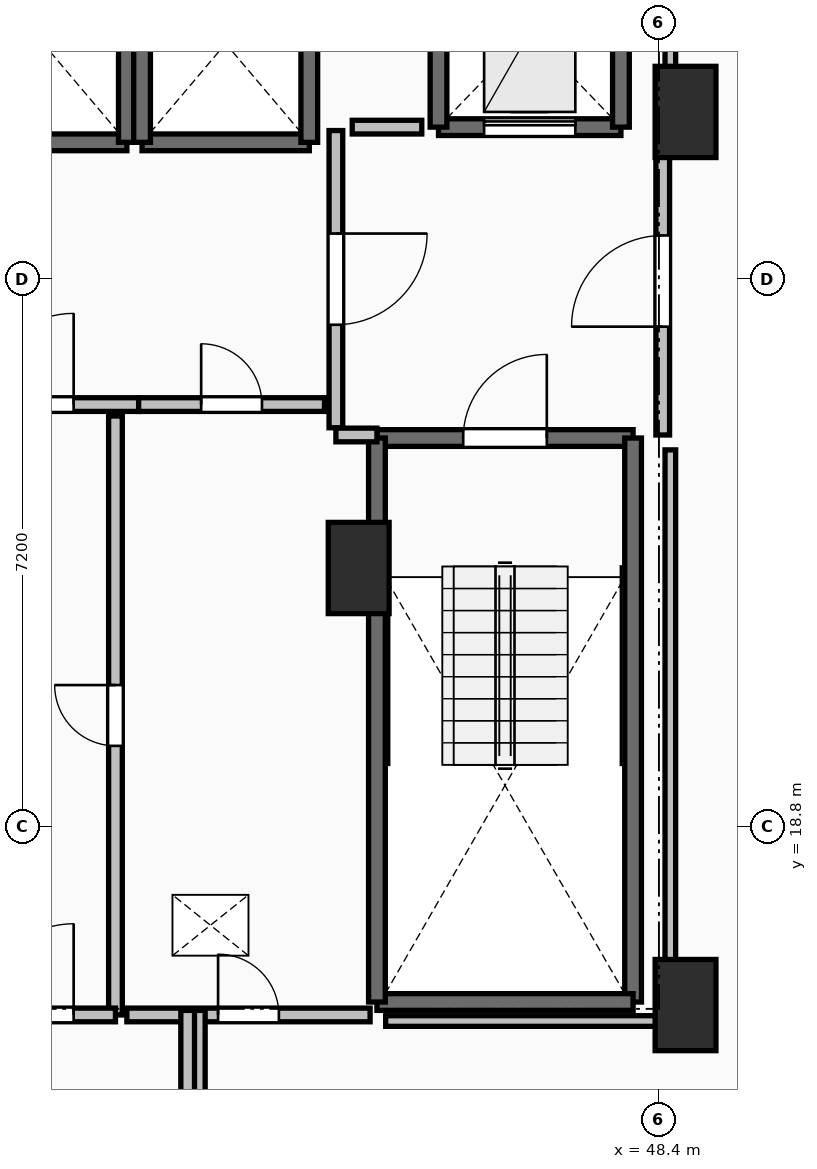
"""IFC4 building model, lengths in metres.
Left out: names, types, materials, properties, quantities, classifications, styles, units other than length and angle.
Written with IfcOpenShell. Run it as: python <this file> out.ifc"""

import sys

from ifc_helpers import new_model, si_unit, direction, frame, frame_2d, origin, origin_2d, place, context, subcontext, project, spatial, rectangle, extrude, element, fill, save


model = new_model("IFC4")
c1 = context("Model", 3, precision=1e-05, world=origin(), true_north=direction((0.0, 1.0)))
c2 = subcontext(c1, "Body", "Model", "MODEL_VIEW")
j1 = project(units=[si_unit("LENGTHUNIT", "METRE"), si_unit("PLANEANGLEUNIT", "RADIAN")], contexts=[c1])
p1 = place(None, origin())
s1 = spatial("IfcSite", under=j1, at=p1, CompositionType="ELEMENT")
p2 = place(p1, origin())
s2 = spatial("IfcBuilding", under=s1, at=p2, CompositionType="ELEMENT")
p3 = place(p2, frame((0.0, 0.0, 89.3)))
s3 = spatial("IfcBuildingStorey", under=s2, at=p3, CompositionType="ELEMENT", Elevation=89.3)
for number, where, z_axis, x_axis in (
    (1, (48.75, 28.2, 0.0), (0.0, 0.0, 1.0), (1.0, 0.0, 0.0)),
    (2, (48.75, 16.45, 0.0), (0.0, 0.0, 1.0), (1.0, 0.0, 0.0)),
    (3, (44.45, 22.2, 0.0), (0.0, 0.0, 1.0), (1.0, 0.0, 0.0)),
):
    element("IfcColumn", number, at=place(p3, frame(where, z_axis=z_axis, x_axis=x_axis)), inside=s3, PredefinedType="PILASTER", context=c2, shape_type="SweptSolid", body=[
        extrude(rectangle(XDim=0.8, YDim=1.2, at=origin_2d()), origin(), (0.0, 0.0, 1.0), 3.5),
    ])
p4 = place(p3, frame((44.69, 23.91, 0.0), z_axis=(0.0, 0.0, 1.0), x_axis=(1.0, 0.0, 0.0)))
e4 = element("IfcWall", 4, at=p4, inside=s3, PredefinedType="SOLIDWALL", context=c2, shape_type="SweptSolid", body=[
    extrude(rectangle(XDim=3.37, YDim=0.22, at=frame_2d((1.685, 0.0))), origin(), (0.0, 0.0, 1.0), 3.24),
])
p5 = place(p4, frame((1.135, 0.0, 0.0)))
e5 = element("IfcOpeningElement", 5, at=p5, cuts=e4, PredefinedType="OPENING", context=c2, shape_type="SweptSolid", body=[
    extrude(rectangle(XDim=1.1, YDim=2.15, at=frame_2d((0.55, 1.075))), frame((0.0, 0.125, 0.0), z_axis=(0.0, -1.0, 0.0), x_axis=(1.0, 0.0, 0.0)), (0.0, 0.0, 1.0), 0.25),
])
p6 = place(p3, frame((48.06, 23.91, 0.0), z_axis=(0.0, 0.0, 1.0), x_axis=(0.0, -1.0, 0.0)))
e6 = element("IfcWall", 6, at=p6, inside=s3, PredefinedType="SOLIDWALL", context=c2, shape_type="SweptSolid", body=[
    extrude(rectangle(XDim=7.42, YDim=0.22, at=frame_2d((3.71, 0.0))), origin(), (0.0, 0.0, 1.0), 3.24),
])
p7 = place(p3, frame((48.06, 16.49, 0.0), z_axis=(0.0, 0.0, 1.0), x_axis=(-1.0, 0.0, 0.0)))
e7 = element("IfcWall", 7, at=p7, inside=s3, PredefinedType="SOLIDWALL", context=c2, shape_type="SweptSolid", body=[
    extrude(rectangle(XDim=3.37, YDim=0.22, at=frame_2d((1.685, 0.0))), origin(), (0.0, 0.0, 1.0), 3.24),
])
p8 = place(p3, frame((44.69, 16.49, 0.0), z_axis=(0.0, 0.0, 1.0), x_axis=(0.0, 1.0, 0.0)))
e8 = element("IfcWall", 8, at=p8, inside=s3, PredefinedType="SOLIDWALL", context=c2, shape_type="SweptSolid", body=[
    extrude(rectangle(XDim=7.42, YDim=0.22, at=frame_2d((3.71, 0.0))), origin(), (0.0, 0.0, 1.0), 3.24),
])
p9 = place(p3, frame((39.2, 27.8, 0.0), z_axis=(0.0, 0.0, 1.0), x_axis=(1.0, 0.0, 0.0)))
e9 = element("IfcWall", 9, at=p9, inside=s3, PredefinedType="SOLIDWALL", context=c2, shape_type="SweptSolid", body=[
    extrude(rectangle(XDim=2.2, YDim=0.22, at=frame_2d((1.1, 0.0))), origin(), (0.0, 0.0, 1.0), 3.24),
])
p10 = place(p3, frame((41.4, 27.8, 0.0), z_axis=(0.0, 0.0, 1.0), x_axis=(0.0, 1.0, 0.0)))
e10 = element("IfcWall", 10, at=p10, inside=s3, PredefinedType="SOLIDWALL", context=c2, shape_type="SweptSolid", body=[
    extrude(rectangle(XDim=2.6, YDim=0.22, at=frame_2d((1.3, 0.0))), origin(), (0.0, 0.0, 1.0), 3.24),
])
p11 = place(p3, frame((41.6, 27.8, 0.0), z_axis=(0.0, 0.0, 1.0), x_axis=(1.0, 0.0, 0.0)))
e11 = element("IfcWall", 11, at=p11, inside=s3, PredefinedType="SOLIDWALL", context=c2, shape_type="SweptSolid", body=[
    extrude(rectangle(XDim=2.2, YDim=0.22, at=frame_2d((1.1, 0.0))), origin(), (0.0, 0.0, 1.0), 3.24),
])
for number, where, z_axis, x_axis in (
    (12, (43.8, 27.8, 0.0), (0.0, 0.0, 1.0), (0.0, 1.0, 0.0)),
    (13, (41.6, 30.4, 0.0), (0.0, 0.0, 1.0), (0.0, -1.0, 0.0)),
):
    element("IfcWall", number, at=place(p3, frame(where, z_axis=z_axis, x_axis=x_axis)), inside=s3, PredefinedType="SOLIDWALL", context=c2, shape_type="SweptSolid", body=[
        extrude(rectangle(XDim=2.6, YDim=0.22, at=frame_2d((1.3, 0.0))), origin(), (0.0, 0.0, 1.0), 3.24),
    ])
p12 = place(p3, frame((45.5, 28.0, 0.0), z_axis=(0.0, 0.0, 1.0), x_axis=(1.0, 0.0, 0.0)))
e14 = element("IfcWall", 14, at=p12, inside=s3, PredefinedType="SHEAR", context=c2, shape_type="SweptSolid", body=[
    extrude(rectangle(XDim=2.4, YDim=0.22, at=frame_2d((1.2, 0.0))), origin(), (0.0, 0.0, 1.0), 3.24),
])
p13 = place(p12, frame((0.6, 0.0, 0.0)))
e15 = element("IfcOpeningElement", 15, at=p13, cuts=e14, PredefinedType="OPENING", context=c2, shape_type="SweptSolid", body=[
    extrude(rectangle(XDim=1.2, YDim=2.2, at=frame_2d((0.6, 1.1))), frame((0.0, 0.125, 0.0), z_axis=(0.0, -1.0, 0.0), x_axis=(1.0, 0.0, 0.0)), (0.0, 0.0, 1.0), 0.25),
])
for number, where, z_axis, x_axis in (
    (16, (47.9, 28.0, 0.0), (0.0, 0.0, 1.0), (0.0, 1.0, 0.0)),
    (17, (45.5, 30.5, 0.0), (0.0, 0.0, 1.0), (0.0, -1.0, 0.0)),
):
    element("IfcWall", number, at=place(p3, frame(where, z_axis=z_axis, x_axis=x_axis)), inside=s3, PredefinedType="SHEAR", context=c2, shape_type="SweptSolid", body=[
        extrude(rectangle(XDim=2.5, YDim=0.22, at=frame_2d((1.25, 0.0))), origin(), (0.0, 0.0, 1.0), 3.24),
    ])
p14 = place(p3, frame((44.15, 27.955, 0.0), z_axis=(0.0, 0.0, 1.0), x_axis=(0.0, -1.0, 0.0)))
e18 = element("IfcWall", 18, at=p14, inside=s3, PredefinedType="PARTITIONING", context=c2, shape_type="SweptSolid", body=[
    extrude(rectangle(XDim=3.91, YDim=0.18, at=frame_2d((1.955, 0.0))), origin(), (0.0, 0.0, 1.0), 3.24),
])
p15 = place(p14, frame((1.355, 0.0, 0.0)))
e19 = element("IfcOpeningElement", 19, at=p15, cuts=e18, PredefinedType="OPENING", context=c2, shape_type="SweptSolid", body=[
    extrude(rectangle(XDim=1.2, YDim=2.15, at=frame_2d((0.6, 1.075))), frame((0.0, 0.105, 0.0), z_axis=(0.0, -1.0, 0.0), x_axis=(1.0, 0.0, 0.0)), (0.0, 0.0, 1.0), 0.21),
])
p16 = place(p3, frame((44.15, 23.95, 0.0), z_axis=(0.0, 0.0, 1.0), x_axis=(1.0, 0.0, 0.0)))
e20 = element("IfcWall", 20, at=p16, inside=s3, PredefinedType="PARTITIONING", context=c2, shape_type="SweptSolid", body=[
    extrude(rectangle(XDim=0.54, YDim=0.18, at=frame_2d((0.27, 0.0))), origin(), (0.0, 0.0, 1.0), 3.24),
])
p17 = place(p3, frame((48.45, 23.95, 0.0), z_axis=(0.0, 0.0, 1.0), x_axis=(0.0, 1.0, 0.0)))
e21 = element("IfcWall", 21, at=p17, inside=s3, PredefinedType="PARTITIONING", context=c2, shape_type="SweptSolid", body=[
    extrude(rectangle(XDim=4.05, YDim=0.18, at=frame_2d((2.025, 0.0))), origin(), (0.0, 0.0, 1.0), 3.24),
])
p18 = place(p17, frame((1.425, 0.0, 0.0)))
e22 = element("IfcOpeningElement", 22, at=p18, cuts=e21, PredefinedType="OPENING", context=c2, shape_type="SweptSolid", body=[
    extrude(rectangle(XDim=1.2, YDim=2.15, at=frame_2d((0.6, 1.075))), frame((0.0, 0.105, 0.0), z_axis=(0.0, -1.0, 0.0), x_axis=(1.0, 0.0, 0.0)), (0.0, 0.0, 1.0), 0.21),
])
p19 = place(p3, frame((38.645, 24.35, 0.0), z_axis=(0.0, 0.0, 1.0), x_axis=(1.0, 0.0, 0.0)))
e23 = element("IfcWall", 23, at=p19, inside=s3, PredefinedType="PARTITIONING", context=c2, shape_type="SweptSolid", body=[
    extrude(rectangle(XDim=2.91, YDim=0.18, at=frame_2d((1.455, 0.0))), origin(), (0.0, 0.0, 1.0), 3.24),
])
p20 = place(p19, frame((0.855, 0.0, 0.0)))
e24 = element("IfcOpeningElement", 24, at=p20, cuts=e23, PredefinedType="OPENING", context=c2, shape_type="SweptSolid", body=[
    extrude(rectangle(XDim=1.2, YDim=2.15, at=frame_2d((0.6, 1.075))), frame((0.0, 0.105, 0.0), z_axis=(0.0, -1.0, 0.0), x_axis=(1.0, 0.0, 0.0)), (0.0, 0.0, 1.0), 0.21),
])
p21 = place(p3, frame((41.555, 24.35, 0.0), z_axis=(0.0, 0.0, 1.0), x_axis=(1.0, 0.0, 0.0)))
e25 = element("IfcWall", 25, at=p21, inside=s3, PredefinedType="PARTITIONING", context=c2, shape_type="SweptSolid", body=[
    extrude(rectangle(XDim=2.445, YDim=0.18, at=frame_2d((1.223, 0.0))), origin(), (0.0, 0.0, 1.0), 3.24),
])
p22 = place(p21, frame((0.823, 0.0, 0.0)))
e26 = element("IfcOpeningElement", 26, at=p22, cuts=e25, PredefinedType="OPENING", context=c2, shape_type="SweptSolid", body=[
    extrude(rectangle(XDim=0.8, YDim=2.05, at=frame_2d((0.4, 1.025))), frame((0.0, 0.105, 0.0), z_axis=(0.0, -1.0, 0.0), x_axis=(1.0, 0.0, 0.0)), (0.0, 0.0, 1.0), 0.21),
])
p23 = place(p3, frame((41.25, 16.32, 0.0), z_axis=(0.0, 0.0, 1.0), x_axis=(0.0, 1.0, 0.0)))
e27 = element("IfcWall", 27, at=p23, inside=s3, PredefinedType="PARTITIONING", context=c2, shape_type="SweptSolid", body=[
    extrude(rectangle(XDim=7.88, YDim=0.18, at=frame_2d((3.94, 0.0))), origin(), (0.0, 0.0, 1.0), 3.24),
])
p24 = place(p23, frame((3.54, 0.0, 0.0)))
e28 = element("IfcOpeningElement", 28, at=p24, cuts=e27, PredefinedType="OPENING", context=c2, shape_type="SweptSolid", body=[
    extrude(rectangle(XDim=0.8, YDim=2.05, at=frame_2d((0.4, 1.025))), frame((0.0, 0.105, 0.0), z_axis=(0.0, -1.0, 0.0), x_axis=(1.0, 0.0, 0.0)), (0.0, 0.0, 1.0), 0.21),
])
p25 = place(p3, frame((38.95, 16.32, 0.0), z_axis=(0.0, 0.0, 1.0), x_axis=(1.0, 0.0, 0.0)))
e29 = element("IfcWall", 29, at=p25, inside=s3, PredefinedType="PARTITIONING", context=c2, shape_type="SweptSolid", body=[
    extrude(rectangle(XDim=2.3, YDim=0.18, at=frame_2d((1.15, 0.0))), origin(), (0.0, 0.0, 1.0), 3.24),
])
p26 = place(p25, frame((0.55, 0.0, 0.0)))
e30 = element("IfcOpeningElement", 30, at=p26, cuts=e29, PredefinedType="OPENING", context=c2, shape_type="SweptSolid", body=[
    extrude(rectangle(XDim=1.2, YDim=2.15, at=frame_2d((0.6, 1.075))), frame((0.0, 0.105, 0.0), z_axis=(0.0, -1.0, 0.0), x_axis=(1.0, 0.0, 0.0)), (0.0, 0.0, 1.0), 0.21),
])
p27 = place(p3, frame((41.4, 16.32, 0.0), z_axis=(0.0, 0.0, 1.0), x_axis=(1.0, 0.0, 0.0)))
e31 = element("IfcWall", 31, at=p27, inside=s3, PredefinedType="PARTITIONING", context=c2, shape_type="SweptSolid", body=[
    extrude(rectangle(XDim=3.2, YDim=0.18, at=frame_2d((1.6, 0.0))), origin(), (0.0, 0.0, 1.0), 3.24),
])
p28 = place(p27, frame((1.2, 0.0, 0.0)))
e32 = element("IfcOpeningElement", 32, at=p28, cuts=e31, PredefinedType="OPENING", context=c2, shape_type="SweptSolid", body=[
    extrude(rectangle(XDim=0.8, YDim=2.05, at=frame_2d((0.4, 1.025))), frame((0.0, 0.105, 0.0), z_axis=(0.0, -1.0, 0.0), x_axis=(1.0, 0.0, 0.0)), (0.0, 0.0, 1.0), 0.21),
])
for number, where, z_axis, x_axis in (
    (33, (42.34, 16.38, 0.0), (0.0, 0.0, 1.0), (0.0, -1.0, 0.0)),
    (34, (42.2, 13.96, 0.0), (0.0, 0.0, 1.0), (0.0, 1.0, 0.0)),
):
    element("IfcWall", number, at=place(p3, frame(where, z_axis=z_axis, x_axis=x_axis)), inside=s3, PredefinedType="PARTITIONING", context=c2, shape_type="SweptSolid", body=[
        extrude(rectangle(XDim=2.42, YDim=0.18, at=frame_2d((1.21, 0.0))), origin(), (0.0, 0.0, 1.0), 2.972),
    ])
p29 = place(p3, frame((45.28, 28.0, 0.0), z_axis=(0.0, 0.0, 1.0), x_axis=(-1.0, 0.0, 0.0)))
e35 = element("IfcWall", 35, at=p29, inside=s3, PredefinedType="PARTITIONING", context=c2, shape_type="SweptSolid", body=[
    extrude(rectangle(XDim=0.915, YDim=0.18, at=frame_2d((0.458, 0.0))), origin(), (0.0, 0.0, 1.0), 3.24),
])
p30 = place(p3, frame((48.55, 33.45, 0.0), z_axis=(0.0, 0.0, 1.0), x_axis=(0.0, -1.0, 0.0)))
e36 = element("IfcWall", 36, at=p30, inside=s3, PredefinedType="PARTITIONING", context=c2, shape_type="SweptSolid", body=[
    extrude(rectangle(XDim=5.254, YDim=0.14, at=frame_2d((2.627, 0.0))), origin(), (0.0, 0.0, 1.0), 2.432),
])
p31 = place(p3, frame((48.55, 23.754, 0.0), z_axis=(0.0, 0.0, 1.0), x_axis=(0.0, -1.0, 0.0)))
e37 = element("IfcWall", 37, at=p31, inside=s3, PredefinedType="PARTITIONING", context=c2, shape_type="SweptSolid", body=[
    extrude(rectangle(XDim=7.514, YDim=0.14, at=frame_2d((3.757, 0.0))), origin(), (0.0, 0.0, 1.0), 2.432),
])
p32 = place(p3, frame((48.55, 16.24, 0.0), z_axis=(0.0, 0.0, 1.0), x_axis=(-1.0, 0.0, 0.0)))
e38 = element("IfcWall", 38, at=p32, inside=s3, PredefinedType="PARTITIONING", context=c2, shape_type="SweptSolid", body=[
    extrude(rectangle(XDim=3.745, YDim=0.14, at=frame_2d((1.873, 0.0))), origin(), (0.0, 0.0, 1.0), 2.432),
])
p33 = place(p5, origin())
e39 = element("IfcDoor", 39, at=p33, inside=s3, OperationType="SINGLE_SWING_RIGHT", PredefinedType="DOOR", context=c2, shape_type="SweptSolid", body=[
    extrude(rectangle(XDim=1.1, YDim=2.15, at=frame_2d((0.55, 1.075))), frame((0.0, 0.025, 0.0), z_axis=(0.0, -1.0, 0.0), x_axis=(1.0, 0.0, 0.0)), (0.0, 0.0, 1.0), 0.05),
])
fill(e5, e39)
p34 = place(p13, origin())
e40 = element("IfcDoor", 40, at=p34, inside=s3, OperationType="SLIDING_TO_LEFT", PredefinedType="DOOR", context=c2, shape_type="SweptSolid", body=[
    extrude(rectangle(XDim=1.2, YDim=2.2, at=frame_2d((0.6, 1.1))), frame((0.0, 0.025, 0.0), z_axis=(0.0, -1.0, 0.0), x_axis=(1.0, 0.0, 0.0)), (0.0, 0.0, 1.0), 0.05),
])
fill(e15, e40)
p35 = place(p15, origin())
e41 = element("IfcDoor", 41, at=p35, inside=s3, OperationType="SINGLE_SWING_LEFT", PredefinedType="DOOR", context=c2, shape_type="SweptSolid", body=[
    extrude(rectangle(XDim=1.2, YDim=2.15, at=frame_2d((0.6, 1.075))), frame((0.0, 0.025, 0.0), z_axis=(0.0, -1.0, 0.0), x_axis=(1.0, 0.0, 0.0)), (0.0, 0.0, 1.0), 0.05),
])
fill(e19, e41)
p36 = place(p18, origin())
e42 = element("IfcDoor", 42, at=p36, inside=s3, OperationType="SINGLE_SWING_LEFT", PredefinedType="DOOR", context=c2, shape_type="SweptSolid", body=[
    extrude(rectangle(XDim=1.2, YDim=2.15, at=frame_2d((0.6, 1.075))), frame((0.0, 0.025, 0.0), z_axis=(0.0, -1.0, 0.0), x_axis=(1.0, 0.0, 0.0)), (0.0, 0.0, 1.0), 0.05),
])
fill(e22, e42)
p37 = place(p20, origin())
e43 = element("IfcDoor", 43, at=p37, inside=s3, OperationType="SINGLE_SWING_RIGHT", PredefinedType="DOOR", context=c2, shape_type="SweptSolid", body=[
    extrude(rectangle(XDim=1.2, YDim=2.15, at=frame_2d((0.6, 1.075))), frame((0.0, 0.025, 0.0), z_axis=(0.0, -1.0, 0.0), x_axis=(1.0, 0.0, 0.0)), (0.0, 0.0, 1.0), 0.05),
])
fill(e24, e43)
p38 = place(p22, origin())
e44 = element("IfcDoor", 44, at=p38, inside=s3, OperationType="SINGLE_SWING_LEFT", PredefinedType="DOOR", context=c2, shape_type="SweptSolid", body=[
    extrude(rectangle(XDim=0.8, YDim=2.05, at=frame_2d((0.4, 1.025))), frame((0.0, 0.025, 0.0), z_axis=(0.0, -1.0, 0.0), x_axis=(1.0, 0.0, 0.0)), (0.0, 0.0, 1.0), 0.05),
])
fill(e26, e44)
p39 = place(p24, origin())
e45 = element("IfcDoor", 45, at=p39, inside=s3, OperationType="SINGLE_SWING_RIGHT", PredefinedType="DOOR", context=c2, shape_type="SweptSolid", body=[
    extrude(rectangle(XDim=0.8, YDim=2.05, at=frame_2d((0.4, 1.025))), frame((0.0, 0.025, 0.0), z_axis=(0.0, -1.0, 0.0), x_axis=(1.0, 0.0, 0.0)), (0.0, 0.0, 1.0), 0.05),
])
fill(e28, e45)
p40 = place(p26, origin())
e46 = element("IfcDoor", 46, at=p40, inside=s3, OperationType="SINGLE_SWING_RIGHT", PredefinedType="DOOR", context=c2, shape_type="SweptSolid", body=[
    extrude(rectangle(XDim=1.2, YDim=2.15, at=frame_2d((0.6, 1.075))), frame((0.0, 0.025, 0.0), z_axis=(0.0, -1.0, 0.0), x_axis=(1.0, 0.0, 0.0)), (0.0, 0.0, 1.0), 0.05),
])
fill(e30, e46)
p41 = place(p28, origin())
e47 = element("IfcDoor", 47, at=p41, inside=s3, OperationType="SINGLE_SWING_LEFT", PredefinedType="DOOR", context=c2, shape_type="SweptSolid", body=[
    extrude(rectangle(XDim=0.8, YDim=2.05, at=frame_2d((0.4, 1.025))), frame((0.0, 0.025, 0.0), z_axis=(0.0, -1.0, 0.0), x_axis=(1.0, 0.0, 0.0)), (0.0, 0.0, 1.0), 0.05),
])
fill(e32, e47)
save(model, sys.argv[1])
